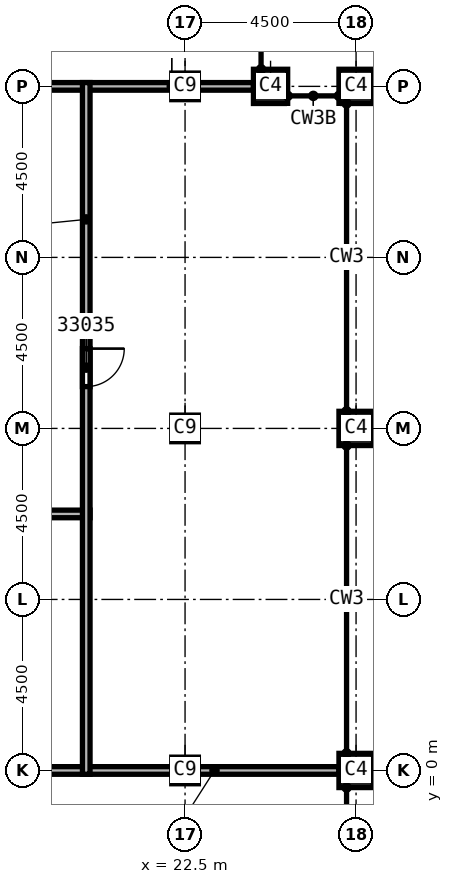
"""IFC4 building model, lengths in metres.
Left out: names, types, materials, properties, quantities, classifications, styles, units other than length and angle.
Written with IfcOpenShell. Run it as: python <this file> out.ifc"""

import sys

from ifc_helpers import new_model, si_unit, direction, frame, frame_2d, origin, origin_2d, place, context, subcontext, project, spatial, rectangle, extrude, element, fill, save


model = new_model("IFC4")
c1 = context("Model", 3, precision=1e-05, world=origin(), true_north=direction((0.0, 1.0)))
c2 = subcontext(c1, "Body", "Model", "MODEL_VIEW")
j1 = project(units=[si_unit("LENGTHUNIT", "METRE"), si_unit("PLANEANGLEUNIT", "RADIAN")], contexts=[c1])
p1 = place(None, origin())
s1 = spatial("IfcSite", under=j1, at=p1, CompositionType="ELEMENT")
p2 = place(p1, origin())
s2 = spatial("IfcBuilding", under=s1, at=p2, CompositionType="ELEMENT")
p3 = place(p2, frame((0.0, 0.0, 361.0)))
s3 = spatial("IfcBuildingStorey", under=s2, at=p3, CompositionType="ELEMENT", Elevation=361.0)
for number, where, z_axis, x_axis in (
    (1, (22.5, 0.0, 0.0), (0.0, 0.0, 1.0), (1.0, 0.0, 0.0)),
    (2, (22.5, 9.0, 0.0), (0.0, 0.0, 1.0), (1.0, 0.0, 0.0)),
    (3, (22.5, 18.0, 0.0), (0.0, 0.0, 1.0), (1.0, 0.0, 0.0)),
):
    element("IfcColumn", number, at=place(p3, frame(where, z_axis=z_axis, x_axis=x_axis)), inside=s3, PredefinedType="COLUMN", context=c2, shape_type="SweptSolid", body=[
        extrude(rectangle(XDim=0.7, YDim=0.7, at=origin_2d()), origin(), (0.0, 0.0, 1.0), 4.6),
    ])
for number, where, z_axis, x_axis in (
    (4, (27.0, 0.0, 0.0), (0.0, 0.0, 1.0), (0.0, 1.0, 0.0)),
    (5, (27.0, 9.0, 0.0), (0.0, 0.0, 1.0), (0.0, 1.0, 0.0)),
    (6, (27.0, 18.0, 0.0), (0.0, 0.0, 1.0), (0.0, 1.0, 0.0)),
    (7, (24.75, 18.0, 0.0), (0.0, 0.0, 1.0), (1.0, 0.0, 0.0)),
):
    element("IfcColumn", number, at=place(p3, frame(where, z_axis=z_axis, x_axis=x_axis)), inside=s3, PredefinedType="COLUMN", context=c2, shape_type="SweptSolid", body=[
        extrude(rectangle(XDim=0.9, YDim=0.9, at=origin_2d()), origin(), (0.0, 0.0, 1.0), 4.6),
    ])
p4 = place(p3, frame((15.4, 6.75, 0.0), z_axis=(0.0, 0.0, 1.0), x_axis=(1.0, 0.0, 0.0)))
e8 = element("IfcWall", 8, at=p4, inside=s3, PredefinedType="PARTITIONING", context=c2, shape_type="SweptSolid", body=[
    extrude(rectangle(XDim=4.6, YDim=0.2, at=frame_2d((2.3, 0.0))), origin(), (0.0, 0.0, 1.0), 4.15),
])
p5 = place(p3, frame((15.4, 18.0, 0.0), z_axis=(0.0, 0.0, 1.0), x_axis=(1.0, 0.0, 0.0)))
e9 = element("IfcWall", 9, at=p5, inside=s3, PredefinedType="PARTITIONING", context=c2, shape_type="SweptSolid", body=[
    extrude(rectangle(XDim=8.9, YDim=0.2, at=frame_2d((4.45, 0.0))), origin(), (0.0, 0.0, 1.0), 4.15),
])
p6 = place(p3, frame((26.55, 0.0, 0.0), z_axis=(0.0, 0.0, 1.0), x_axis=(-1.0, 0.0, 0.0)))
e10 = element("IfcWall", 10, at=p6, inside=s3, PredefinedType="PARTITIONING", context=c2, shape_type="SweptSolid", body=[
    extrude(rectangle(XDim=11.15, YDim=0.2, at=frame_2d((5.575, 0.0))), origin(), (0.0, 0.0, 1.0), 4.15),
])
p7 = place(p3, frame((19.9, 18.1, 0.0), z_axis=(0.0, 0.0, 1.0), x_axis=(0.0, -1.0, 0.0)))
e11 = element("IfcWall", 11, at=p7, inside=s3, PredefinedType="PARTITIONING", context=c2, shape_type="SweptSolid", body=[
    extrude(rectangle(XDim=18.2, YDim=0.2, at=frame_2d((9.1, 0.0))), origin(), (0.0, 0.0, 1.0), 4.15),
])
p8 = place(p7, frame((7.0, 0.0, 0.0)))
e12 = element("IfcOpeningElement", 12, at=p8, cuts=e11, PredefinedType="OPENING", context=c2, shape_type="SweptSolid", body=[
    extrude(rectangle(XDim=1.0, YDim=2.1, at=frame_2d((0.5, 1.05))), frame((0.0, 0.1, 0.0), z_axis=(0.0, -1.0, 0.0), x_axis=(1.0, 0.0, 0.0)), (0.0, 0.0, 1.0), 0.2),
])
p9 = place(p8, origin())
e13 = element("IfcDoor", 13, at=p9, inside=s3, OperationType="SINGLE_SWING_RIGHT", PredefinedType="DOOR", context=c2, shape_type="SweptSolid", body=[
    extrude(rectangle(XDim=1.0, YDim=2.1, at=frame_2d((0.5, 1.05))), frame((0.0, 0.025, 0.0), z_axis=(0.0, -1.0, 0.0), x_axis=(1.0, 0.0, 0.0)), (0.0, 0.0, 1.0), 0.05),
])
fill(e12, e13)
save(model, sys.argv[1])
